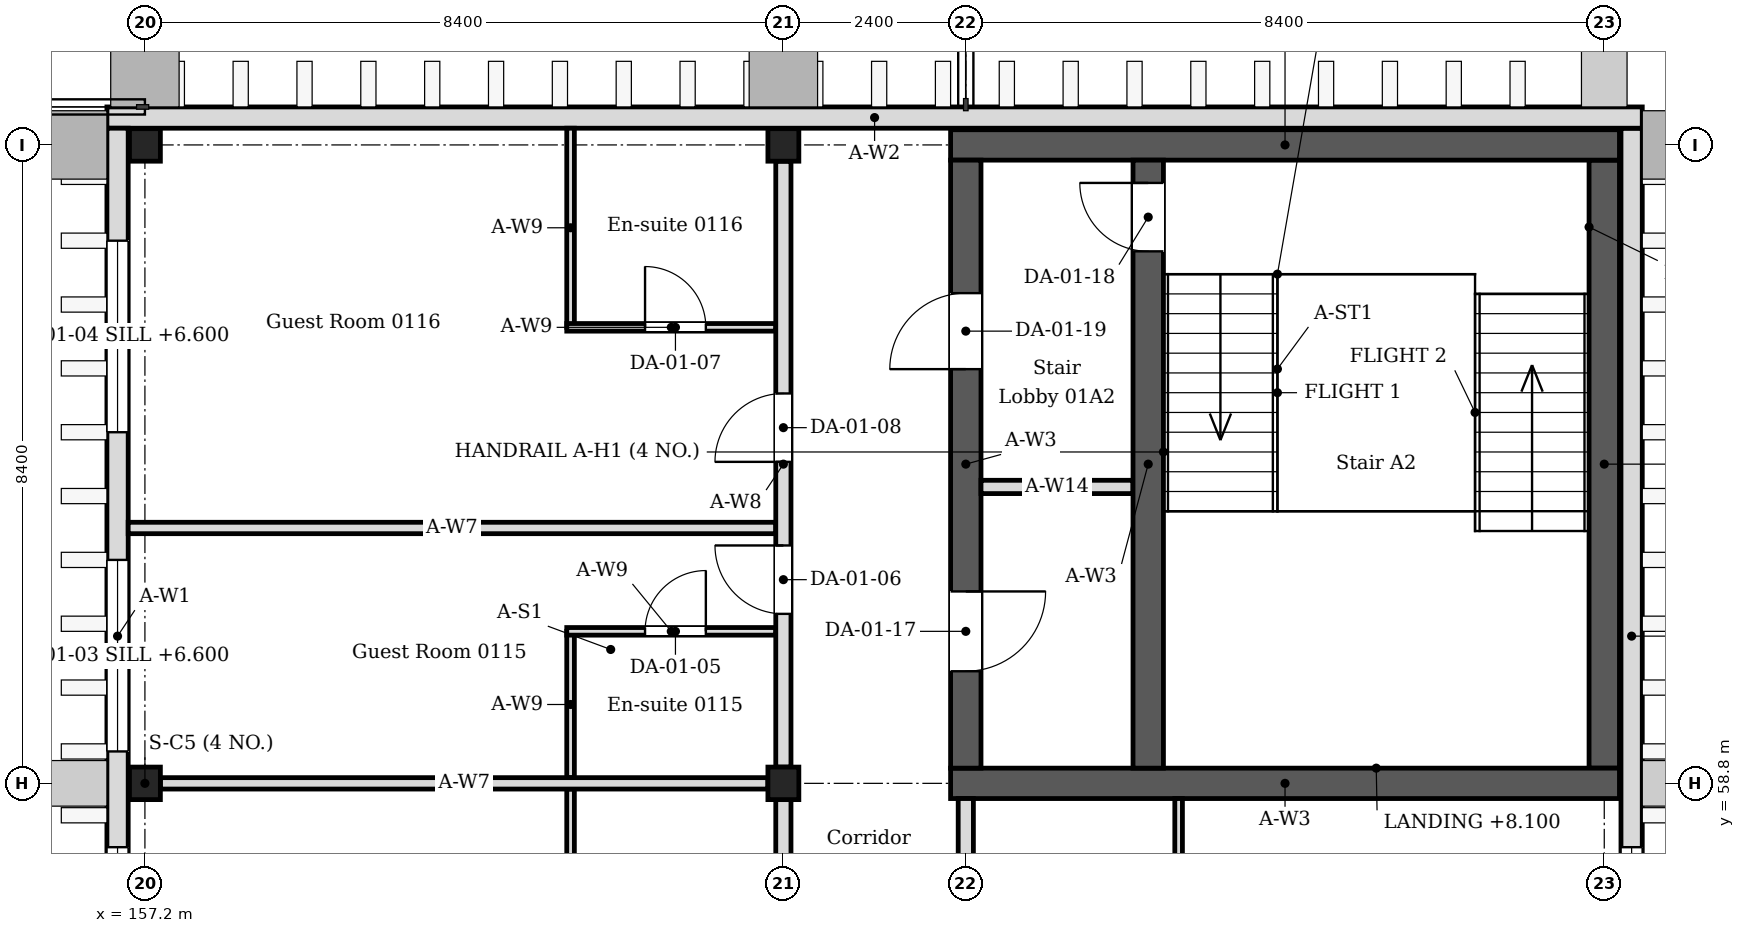
"""IFC4 building model, lengths in metres.
Left out: names, types, materials, properties, quantities, classifications, styles, units other than length and angle.
Written with IfcOpenShell. Run it as: python <this file> out.ifc"""

import sys

from ifc_helpers import new_model, si_unit, direction, frame, frame_2d, origin, origin_2d, place, context, subcontext, project, spatial, rectangle, i_section, extrude, element, fill, save


model = new_model("IFC4")
c1 = context("Model", 3, precision=1e-05, world=origin(), true_north=direction((0.0, 1.0)))
c2 = subcontext(c1, "Body", "Model", "MODEL_VIEW")
j1 = project(units=[si_unit("LENGTHUNIT", "METRE"), si_unit("PLANEANGLEUNIT", "RADIAN")], contexts=[c1])
p1 = place(None, origin())
s1 = spatial("IfcSite", under=j1, at=p1, CompositionType="ELEMENT")
p2 = place(p1, origin())
s2 = spatial("IfcBuilding", under=s1, at=p2, CompositionType="ELEMENT")
p3 = place(p2, frame((0.0, 0.0, 6.0)))
s3 = spatial("IfcBuildingStorey", under=s2, at=p3, CompositionType="ELEMENT", Elevation=6.0)
for number, where, z_axis, x_axis in (
    (1, (157.2, 58.8, 0.0), (0.0, 0.0, 1.0), (1.0, 0.0, 0.0)),
    (2, (157.2, 67.2, 0.0), (0.0, 0.0, 1.0), (1.0, 0.0, 0.0)),
    (3, (165.6, 58.8, 0.0), (0.0, 0.0, 1.0), (1.0, 0.0, 0.0)),
    (4, (165.6, 67.2, 0.0), (0.0, 0.0, 1.0), (1.0, 0.0, 0.0)),
):
    element("IfcColumn", number, at=place(p3, frame(where, z_axis=z_axis, x_axis=x_axis)), inside=s3, PredefinedType="COLUMN", context=c2, shape_type="SweptSolid", body=[
        extrude(i_section(OverallWidth=0.407, OverallDepth=0.428, WebThickness=0.02, FlangeThickness=0.035, FilletRadius=0.022, at=origin_2d()), origin(), (0.0, 0.0, 1.0), 4.2),
    ])
for number, where, z_axis, x_axis in (
    (5, (167.8, 58.8, 0.0), (0.0, 0.0, 1.0), (1.0, 0.0, 0.0)),
    (6, (167.8, 67.2, 0.0), (0.0, 0.0, 1.0), (1.0, 0.0, 0.0)),
):
    element("IfcWall", number, at=place(p3, frame(where, z_axis=z_axis, x_axis=x_axis)), inside=s3, PredefinedType="SOLIDWALL", context=c2, shape_type="SweptSolid", body=[
        extrude(rectangle(XDim=8.8, YDim=0.4, at=frame_2d((4.4, 0.0))), origin(), (0.0, 0.0, 1.0), 4.05),
    ])
p4 = place(p3, frame((168.0, 59.0, 0.0), z_axis=(0.0, 0.0, 1.0), x_axis=(0.0, 1.0, 0.0)))
e7 = element("IfcWall", 7, at=p4, inside=s3, PredefinedType="SOLIDWALL", context=c2, shape_type="SweptSolid", body=[
    extrude(rectangle(XDim=8.0, YDim=0.4, at=frame_2d((4.0, 0.0))), origin(), (0.0, 0.0, 1.0), 4.05),
])
p5 = place(p4, frame((1.275, 0.0, 0.0)))
e8 = element("IfcOpeningElement", 8, at=p5, cuts=e7, PredefinedType="OPENING", context=c2, shape_type="SweptSolid", body=[
    extrude(rectangle(XDim=1.05, YDim=2.1, at=frame_2d((0.525, 1.05))), frame((0.0, 0.21, 0.0), z_axis=(0.0, -1.0, 0.0), x_axis=(1.0, 0.0, 0.0)), (0.0, 0.0, 1.0), 0.42),
])
p6 = place(p4, frame((5.25, 0.0, 0.0)))
e9 = element("IfcOpeningElement", 9, at=p6, cuts=e7, PredefinedType="OPENING", context=c2, shape_type="SweptSolid", body=[
    extrude(rectangle(XDim=1.0, YDim=2.1, at=frame_2d((0.5, 1.05))), frame((0.0, 0.21, 0.0), z_axis=(0.0, -1.0, 0.0), x_axis=(1.0, 0.0, 0.0)), (0.0, 0.0, 1.0), 0.42),
])
p7 = place(p3, frame((176.4, 59.0, 0.0), z_axis=(0.0, 0.0, 1.0), x_axis=(0.0, 1.0, 0.0)))
e10 = element("IfcWall", 10, at=p7, inside=s3, PredefinedType="SOLIDWALL", context=c2, shape_type="SweptSolid", body=[
    extrude(rectangle(XDim=8.0, YDim=0.4, at=frame_2d((4.0, 0.0))), origin(), (0.0, 0.0, 1.0), 4.05),
])
p8 = place(p3, frame((156.84, 50.3, 0.0), z_axis=(0.0, 0.0, 1.0), x_axis=(0.0, 1.0, 0.0)))
e11 = element("IfcWall", 11, at=p8, inside=s3, PredefinedType="SOLIDWALL", context=c2, shape_type="SweptSolid", body=[
    extrude(rectangle(XDim=17.12, YDim=0.28, at=frame_2d((8.56, 0.0))), origin(), (0.0, 0.0, 1.0), 4.05),
])
p9 = place(p8, frame((0.94, 0.0, 0.6)))
e12 = element("IfcOpeningElement", 12, at=p9, cuts=e11, PredefinedType="OPENING", context=c2, shape_type="SweptSolid", body=[
    extrude(rectangle(XDim=2.52, YDim=2.4, at=frame_2d((1.26, 1.2))), frame((0.0, 0.15, 0.0), z_axis=(0.0, -1.0, 0.0), x_axis=(1.0, 0.0, 0.0)), (0.0, 0.0, 1.0), 0.3),
])
p10 = place(p8, frame((5.14, 0.0, 0.6)))
e13 = element("IfcOpeningElement", 13, at=p10, cuts=e11, PredefinedType="OPENING", context=c2, shape_type="SweptSolid", body=[
    extrude(rectangle(XDim=2.52, YDim=2.4, at=frame_2d((1.26, 1.2))), frame((0.0, 0.15, 0.0), z_axis=(0.0, -1.0, 0.0), x_axis=(1.0, 0.0, 0.0)), (0.0, 0.0, 1.0), 0.3),
])
p11 = place(p8, frame((8.92, 0.0, 0.6)))
e14 = element("IfcOpeningElement", 14, at=p11, cuts=e11, PredefinedType="OPENING", context=c2, shape_type="SweptSolid", body=[
    extrude(rectangle(XDim=2.52, YDim=2.4, at=frame_2d((1.26, 1.2))), frame((0.0, 0.15, 0.0), z_axis=(0.0, -1.0, 0.0), x_axis=(1.0, 0.0, 0.0)), (0.0, 0.0, 1.0), 0.3),
])
p12 = place(p8, frame((13.12, 0.0, 0.6)))
e15 = element("IfcOpeningElement", 15, at=p12, cuts=e11, PredefinedType="OPENING", context=c2, shape_type="SweptSolid", body=[
    extrude(rectangle(XDim=2.52, YDim=2.4, at=frame_2d((1.26, 1.2))), frame((0.0, 0.15, 0.0), z_axis=(0.0, -1.0, 0.0), x_axis=(1.0, 0.0, 0.0)), (0.0, 0.0, 1.0), 0.3),
])
p13 = place(p3, frame((176.76, 50.3, 0.0), z_axis=(0.0, 0.0, 1.0), x_axis=(0.0, 1.0, 0.0)))
e16 = element("IfcWall", 16, at=p13, inside=s3, PredefinedType="SOLIDWALL", context=c2, shape_type="SweptSolid", body=[
    extrude(rectangle(XDim=17.12, YDim=0.28, at=frame_2d((8.56, 0.0))), origin(), (0.0, 0.0, 1.0), 4.05),
])
p14 = place(p13, frame((0.94, 0.0, 0.6)))
e17 = element("IfcOpeningElement", 17, at=p14, cuts=e16, PredefinedType="OPENING", context=c2, shape_type="SweptSolid", body=[
    extrude(rectangle(XDim=2.52, YDim=2.4, at=frame_2d((1.26, 1.2))), frame((0.0, 0.15, 0.0), z_axis=(0.0, -1.0, 0.0), x_axis=(1.0, 0.0, 0.0)), (0.0, 0.0, 1.0), 0.3),
])
p15 = place(p13, frame((5.14, 0.0, 0.6)))
e18 = element("IfcOpeningElement", 18, at=p15, cuts=e16, PredefinedType="OPENING", context=c2, shape_type="SweptSolid", body=[
    extrude(rectangle(XDim=2.52, YDim=2.4, at=frame_2d((1.26, 1.2))), frame((0.0, 0.15, 0.0), z_axis=(0.0, -1.0, 0.0), x_axis=(1.0, 0.0, 0.0)), (0.0, 0.0, 1.0), 0.3),
])
p16 = place(p3, frame((156.7, 67.56, 0.0), z_axis=(0.0, 0.0, 1.0), x_axis=(1.0, 0.0, 0.0)))
e19 = element("IfcWall", 19, at=p16, inside=s3, PredefinedType="SOLIDWALL", context=c2, shape_type="SweptSolid", body=[
    extrude(rectangle(XDim=20.2, YDim=0.28, at=frame_2d((10.1, 0.0))), origin(), (0.0, 0.0, 1.0), 4.05),
])
p17 = place(p3, frame((162.8, 56.4, 0.0), z_axis=(0.0, 0.0, 1.0), x_axis=(0.0, 1.0, 0.0)))
e20 = element("IfcWall", 20, at=p17, inside=s3, PredefinedType="PARTITIONING", context=c2, shape_type="SweptSolid", body=[
    extrude(rectangle(XDim=2.325, YDim=0.1, at=frame_2d((1.163, 0.0))), origin(), (0.0, 0.0, 1.0), 4.05),
])
p18 = place(p3, frame((162.8, 58.875, 0.0), z_axis=(0.0, 0.0, 1.0), x_axis=(0.0, 1.0, 0.0)))
e21 = element("IfcWall", 21, at=p18, inside=s3, PredefinedType="PARTITIONING", context=c2, shape_type="SweptSolid", body=[
    extrude(rectangle(XDim=1.925, YDim=0.1, at=frame_2d((0.962, 0.0))), origin(), (0.0, 0.0, 1.0), 4.05),
])
p19 = place(p3, frame((162.75, 60.8, 0.0), z_axis=(0.0, 0.0, 1.0), x_axis=(1.0, 0.0, 0.0)))
e22 = element("IfcWall", 22, at=p19, inside=s3, PredefinedType="PARTITIONING", context=c2, shape_type="SweptSolid", body=[
    extrude(rectangle(XDim=2.75, YDim=0.1, at=frame_2d((1.375, 0.0))), origin(), (0.0, 0.0, 1.0), 4.05),
])
p20 = place(p19, frame((1.03, 0.0, 0.0)))
e23 = element("IfcOpeningElement", 23, at=p20, cuts=e22, PredefinedType="OPENING", context=c2, shape_type="SweptSolid", body=[
    extrude(rectangle(XDim=0.8, YDim=2.1, at=frame_2d((0.4, 1.05))), frame((0.0, 0.06, 0.0), z_axis=(0.0, -1.0, 0.0), x_axis=(1.0, 0.0, 0.0)), (0.0, 0.0, 1.0), 0.12),
])
p21 = place(p3, frame((162.8, 64.8, 0.0), z_axis=(0.0, 0.0, 1.0), x_axis=(0.0, 1.0, 0.0)))
e24 = element("IfcWall", 24, at=p21, inside=s3, PredefinedType="PARTITIONING", context=c2, shape_type="SweptSolid", body=[
    extrude(rectangle(XDim=2.62, YDim=0.1, at=frame_2d((1.31, 0.0))), origin(), (0.0, 0.0, 1.0), 4.05),
])
p22 = place(p3, frame((162.75, 64.8, 0.0), z_axis=(0.0, 0.0, 1.0), x_axis=(1.0, 0.0, 0.0)))
e25 = element("IfcWall", 25, at=p22, inside=s3, PredefinedType="PARTITIONING", context=c2, shape_type="SweptSolid", body=[
    extrude(rectangle(XDim=2.75, YDim=0.1, at=frame_2d((1.375, 0.0))), origin(), (0.0, 0.0, 1.0), 4.05),
])
p23 = place(p22, frame((1.03, 0.0, 0.0)))
e26 = element("IfcOpeningElement", 26, at=p23, cuts=e25, PredefinedType="OPENING", context=c2, shape_type="SweptSolid", body=[
    extrude(rectangle(XDim=0.8, YDim=2.1, at=frame_2d((0.4, 1.05))), frame((0.0, 0.06, 0.0), z_axis=(0.0, -1.0, 0.0), x_axis=(1.0, 0.0, 0.0)), (0.0, 0.0, 1.0), 0.12),
])
p24 = place(p3, frame((170.8, 56.4, 0.0), z_axis=(0.0, 0.0, 1.0), x_axis=(0.0, 1.0, 0.0)))
e27 = element("IfcWall", 27, at=p24, inside=s3, PredefinedType="PARTITIONING", context=c2, shape_type="SweptSolid", body=[
    extrude(rectangle(XDim=2.2, YDim=0.1, at=frame_2d((1.1, 0.0))), origin(), (0.0, 0.0, 1.0), 4.05),
])
p25 = place(p3, frame((157.404, 58.8, 0.0), z_axis=(0.0, 0.0, 1.0), x_axis=(1.0, 0.0, 0.0)))
e28 = element("IfcWall", 28, at=p25, inside=s3, PredefinedType="PARTITIONING", context=c2, shape_type="SweptSolid", body=[
    extrude(rectangle(XDim=7.993, YDim=0.15, at=frame_2d((3.997, 0.0))), origin(), (0.0, 0.0, 1.0), 3.604),
])
p26 = place(p3, frame((156.98, 62.16, 0.0), z_axis=(0.0, 0.0, 1.0), x_axis=(1.0, 0.0, 0.0)))
e29 = element("IfcWall", 29, at=p26, inside=s3, PredefinedType="PARTITIONING", context=c2, shape_type="SweptSolid", body=[
    extrude(rectangle(XDim=8.52, YDim=0.15, at=frame_2d((4.26, 0.0))), origin(), (0.0, 0.0, 1.0), 3.604),
])
p27 = place(p3, frame((165.6, 50.614, 0.0), z_axis=(0.0, 0.0, 1.0), x_axis=(0.0, 1.0, 0.0)))
e30 = element("IfcWall", 30, at=p27, inside=s3, PredefinedType="PARTITIONING", context=c2, shape_type="SweptSolid", body=[
    extrude(rectangle(XDim=7.972, YDim=0.2, at=frame_2d((3.986, 0.0))), origin(), (0.0, 0.0, 1.0), 3.45),
])
p28 = place(p27, frame((2.636, 0.0, 0.0)))
e31 = element("IfcOpeningElement", 31, at=p28, cuts=e30, PredefinedType="OPENING", context=c2, shape_type="SweptSolid", body=[
    extrude(rectangle(XDim=0.9, YDim=2.1, at=frame_2d((0.45, 1.05))), frame((0.0, 0.11, 0.0), z_axis=(0.0, -1.0, 0.0), x_axis=(1.0, 0.0, 0.0)), (0.0, 0.0, 1.0), 0.22),
])
p29 = place(p27, frame((4.436, 0.0, 0.0)))
e32 = element("IfcOpeningElement", 32, at=p29, cuts=e30, PredefinedType="OPENING", context=c2, shape_type="SweptSolid", body=[
    extrude(rectangle(XDim=0.9, YDim=2.1, at=frame_2d((0.45, 1.05))), frame((0.0, 0.11, 0.0), z_axis=(0.0, -1.0, 0.0), x_axis=(1.0, 0.0, 0.0)), (0.0, 0.0, 1.0), 0.22),
])
p30 = place(p3, frame((165.6, 59.014, 0.0), z_axis=(0.0, 0.0, 1.0), x_axis=(0.0, 1.0, 0.0)))
e33 = element("IfcWall", 33, at=p30, inside=s3, PredefinedType="PARTITIONING", context=c2, shape_type="SweptSolid", body=[
    extrude(rectangle(XDim=7.972, YDim=0.2, at=frame_2d((3.986, 0.0))), origin(), (0.0, 0.0, 1.0), 3.45),
])
p31 = place(p30, frame((2.016, 0.0, 0.0)))
e34 = element("IfcOpeningElement", 34, at=p31, cuts=e33, PredefinedType="OPENING", context=c2, shape_type="SweptSolid", body=[
    extrude(rectangle(XDim=0.9, YDim=2.1, at=frame_2d((0.45, 1.05))), frame((0.0, 0.11, 0.0), z_axis=(0.0, -1.0, 0.0), x_axis=(1.0, 0.0, 0.0)), (0.0, 0.0, 1.0), 0.22),
])
p32 = place(p30, frame((4.016, 0.0, 0.0)))
e35 = element("IfcOpeningElement", 35, at=p32, cuts=e33, PredefinedType="OPENING", context=c2, shape_type="SweptSolid", body=[
    extrude(rectangle(XDim=0.9, YDim=2.1, at=frame_2d((0.45, 1.05))), frame((0.0, 0.11, 0.0), z_axis=(0.0, -1.0, 0.0), x_axis=(1.0, 0.0, 0.0)), (0.0, 0.0, 1.0), 0.22),
])
p33 = place(p3, frame((168.0, 50.614, 0.0), z_axis=(0.0, 0.0, 1.0), x_axis=(0.0, 1.0, 0.0)))
e36 = element("IfcWall", 36, at=p33, inside=s3, PredefinedType="PARTITIONING", context=c2, shape_type="SweptSolid", body=[
    extrude(rectangle(XDim=7.986, YDim=0.2, at=frame_2d((3.993, 0.0))), origin(), (0.0, 0.0, 1.0), 3.45),
])
p34 = place(p33, frame((2.636, 0.0, 0.0)))
e37 = element("IfcOpeningElement", 37, at=p34, cuts=e36, PredefinedType="OPENING", context=c2, shape_type="SweptSolid", body=[
    extrude(rectangle(XDim=0.9, YDim=2.1, at=frame_2d((0.45, 1.05))), frame((0.0, 0.11, 0.0), z_axis=(0.0, -1.0, 0.0), x_axis=(1.0, 0.0, 0.0)), (0.0, 0.0, 1.0), 0.22),
])
p35 = place(p33, frame((4.436, 0.0, 0.0)))
e38 = element("IfcOpeningElement", 38, at=p35, cuts=e36, PredefinedType="OPENING", context=c2, shape_type="SweptSolid", body=[
    extrude(rectangle(XDim=0.9, YDim=2.1, at=frame_2d((0.45, 1.05))), frame((0.0, 0.11, 0.0), z_axis=(0.0, -1.0, 0.0), x_axis=(1.0, 0.0, 0.0)), (0.0, 0.0, 1.0), 0.22),
])
p36 = place(p3, frame((168.2, 62.7, 0.0), z_axis=(0.0, 0.0, 1.0), x_axis=(1.0, 0.0, 0.0)))
e39 = element("IfcWall", 39, at=p36, inside=s3, PredefinedType="PARTITIONING", context=c2, shape_type="SweptSolid", body=[
    extrude(rectangle(XDim=2.0, YDim=0.175, at=frame_2d((1.0, 0.0))), origin(), (0.0, 0.0, 1.0), 4.05),
])
p37 = place(p3, frame((170.4, 59.0, 0.0), z_axis=(0.0, 0.0, 1.0), x_axis=(0.0, 1.0, 0.0)))
e40 = element("IfcWall", 40, at=p37, inside=s3, PredefinedType="SOLIDWALL", context=c2, shape_type="SweptSolid", body=[
    extrude(rectangle(XDim=8.0, YDim=0.4, at=frame_2d((4.0, 0.0))), origin(), (0.0, 0.0, 1.0), 4.05),
])
p38 = place(p37, frame((6.8, 0.0, 0.0)))
e41 = element("IfcOpeningElement", 41, at=p38, cuts=e40, PredefinedType="OPENING", context=c2, shape_type="SweptSolid", body=[
    extrude(rectangle(XDim=0.9, YDim=2.1, at=frame_2d((0.45, 1.05))), frame((0.0, 0.21, 0.0), z_axis=(0.0, -1.0, 0.0), x_axis=(1.0, 0.0, 0.0)), (0.0, 0.0, 1.0), 0.42),
])
p39 = place(p10, origin())
e42 = element("IfcWindow", 42, at=p39, inside=s3, PartitioningType="SINGLE_PANEL", PredefinedType="WINDOW", context=c2, shape_type="SweptSolid", body=[
    extrude(rectangle(XDim=2.52, YDim=2.4, at=frame_2d((1.26, 1.2))), frame((0.0, 0.03, 0.0), z_axis=(0.0, -1.0, 0.0), x_axis=(1.0, 0.0, 0.0)), (0.0, 0.0, 1.0), 0.06),
])
fill(e13, e42)
p40 = place(p11, origin())
e43 = element("IfcWindow", 43, at=p40, inside=s3, PartitioningType="SINGLE_PANEL", PredefinedType="WINDOW", context=c2, shape_type="SweptSolid", body=[
    extrude(rectangle(XDim=2.52, YDim=2.4, at=frame_2d((1.26, 1.2))), frame((0.0, 0.03, 0.0), z_axis=(0.0, -1.0, 0.0), x_axis=(1.0, 0.0, 0.0)), (0.0, 0.0, 1.0), 0.06),
])
fill(e14, e43)
p41 = place(p12, origin())
e44 = element("IfcWindow", 44, at=p41, inside=s3, PartitioningType="SINGLE_PANEL", PredefinedType="WINDOW", context=c2, shape_type="SweptSolid", body=[
    extrude(rectangle(XDim=2.52, YDim=2.4, at=frame_2d((1.26, 1.2))), frame((0.0, 0.03, 0.0), z_axis=(0.0, -1.0, 0.0), x_axis=(1.0, 0.0, 0.0)), (0.0, 0.0, 1.0), 0.06),
])
fill(e15, e44)
p42 = place(p15, origin())
e45 = element("IfcWindow", 45, at=p42, inside=s3, PartitioningType="SINGLE_PANEL", PredefinedType="WINDOW", context=c2, shape_type="SweptSolid", body=[
    extrude(rectangle(XDim=2.52, YDim=2.4, at=frame_2d((1.26, 1.2))), frame((0.0, 0.03, 0.0), z_axis=(0.0, -1.0, 0.0), x_axis=(1.0, 0.0, 0.0)), (0.0, 0.0, 1.0), 0.06),
])
fill(e18, e45)
p43 = place(p20, origin())
e46 = element("IfcDoor", 46, at=p43, inside=s3, OperationType="SINGLE_SWING_RIGHT", PredefinedType="DOOR", context=c2, shape_type="SweptSolid", body=[
    extrude(rectangle(XDim=0.8, YDim=2.1, at=frame_2d((0.4, 1.05))), frame((0.0, 0.025, 0.0), z_axis=(0.0, -1.0, 0.0), x_axis=(1.0, 0.0, 0.0)), (0.0, 0.0, 1.0), 0.05),
])
fill(e23, e46)
p44 = place(p31, origin())
e47 = element("IfcDoor", 47, at=p44, inside=s3, OperationType="SINGLE_SWING_RIGHT", PredefinedType="DOOR", context=c2, shape_type="SweptSolid", body=[
    extrude(rectangle(XDim=0.9, YDim=2.1, at=frame_2d((0.45, 1.05))), frame((0.0, 0.025, 0.0), z_axis=(0.0, -1.0, 0.0), x_axis=(1.0, 0.0, 0.0)), (0.0, 0.0, 1.0), 0.05),
])
fill(e34, e47)
p45 = place(p23, origin())
e48 = element("IfcDoor", 48, at=p45, inside=s3, OperationType="SINGLE_SWING_LEFT", PredefinedType="DOOR", context=c2, shape_type="SweptSolid", body=[
    extrude(rectangle(XDim=0.8, YDim=2.1, at=frame_2d((0.4, 1.05))), frame((0.0, 0.025, 0.0), z_axis=(0.0, -1.0, 0.0), x_axis=(1.0, 0.0, 0.0)), (0.0, 0.0, 1.0), 0.05),
])
fill(e26, e48)
p46 = place(p32, origin())
e49 = element("IfcDoor", 49, at=p46, inside=s3, OperationType="SINGLE_SWING_LEFT", PredefinedType="DOOR", context=c2, shape_type="SweptSolid", body=[
    extrude(rectangle(XDim=0.9, YDim=2.1, at=frame_2d((0.45, 1.05))), frame((0.0, 0.025, 0.0), z_axis=(0.0, -1.0, 0.0), x_axis=(1.0, 0.0, 0.0)), (0.0, 0.0, 1.0), 0.05),
])
fill(e35, e49)
p47 = place(p5, origin())
e50 = element("IfcDoor", 50, at=p47, inside=s3, OperationType="SINGLE_SWING_RIGHT", PredefinedType="DOOR", context=c2, shape_type="SweptSolid", body=[
    extrude(rectangle(XDim=1.05, YDim=2.1, at=frame_2d((0.525, 1.05))), frame((0.0, 0.025, 0.0), z_axis=(0.0, -1.0, 0.0), x_axis=(1.0, 0.0, 0.0)), (0.0, 0.0, 1.0), 0.05),
])
fill(e8, e50)
p48 = place(p38, origin())
e51 = element("IfcDoor", 51, at=p48, inside=s3, OperationType="SINGLE_SWING_RIGHT", PredefinedType="DOOR", context=c2, shape_type="SweptSolid", body=[
    extrude(rectangle(XDim=0.9, YDim=2.1, at=frame_2d((0.45, 1.05))), frame((0.0, 0.025, 0.0), z_axis=(0.0, -1.0, 0.0), x_axis=(1.0, 0.0, 0.0)), (0.0, 0.0, 1.0), 0.05),
])
fill(e41, e51)
p49 = place(p6, origin())
e52 = element("IfcDoor", 52, at=p49, inside=s3, OperationType="SINGLE_SWING_LEFT", PredefinedType="DOOR", context=c2, shape_type="SweptSolid", body=[
    extrude(rectangle(XDim=1.0, YDim=2.1, at=frame_2d((0.5, 1.05))), frame((0.0, 0.025, 0.0), z_axis=(0.0, -1.0, 0.0), x_axis=(1.0, 0.0, 0.0)), (0.0, 0.0, 1.0), 0.05),
])
fill(e9, e52)
save(model, sys.argv[1])
